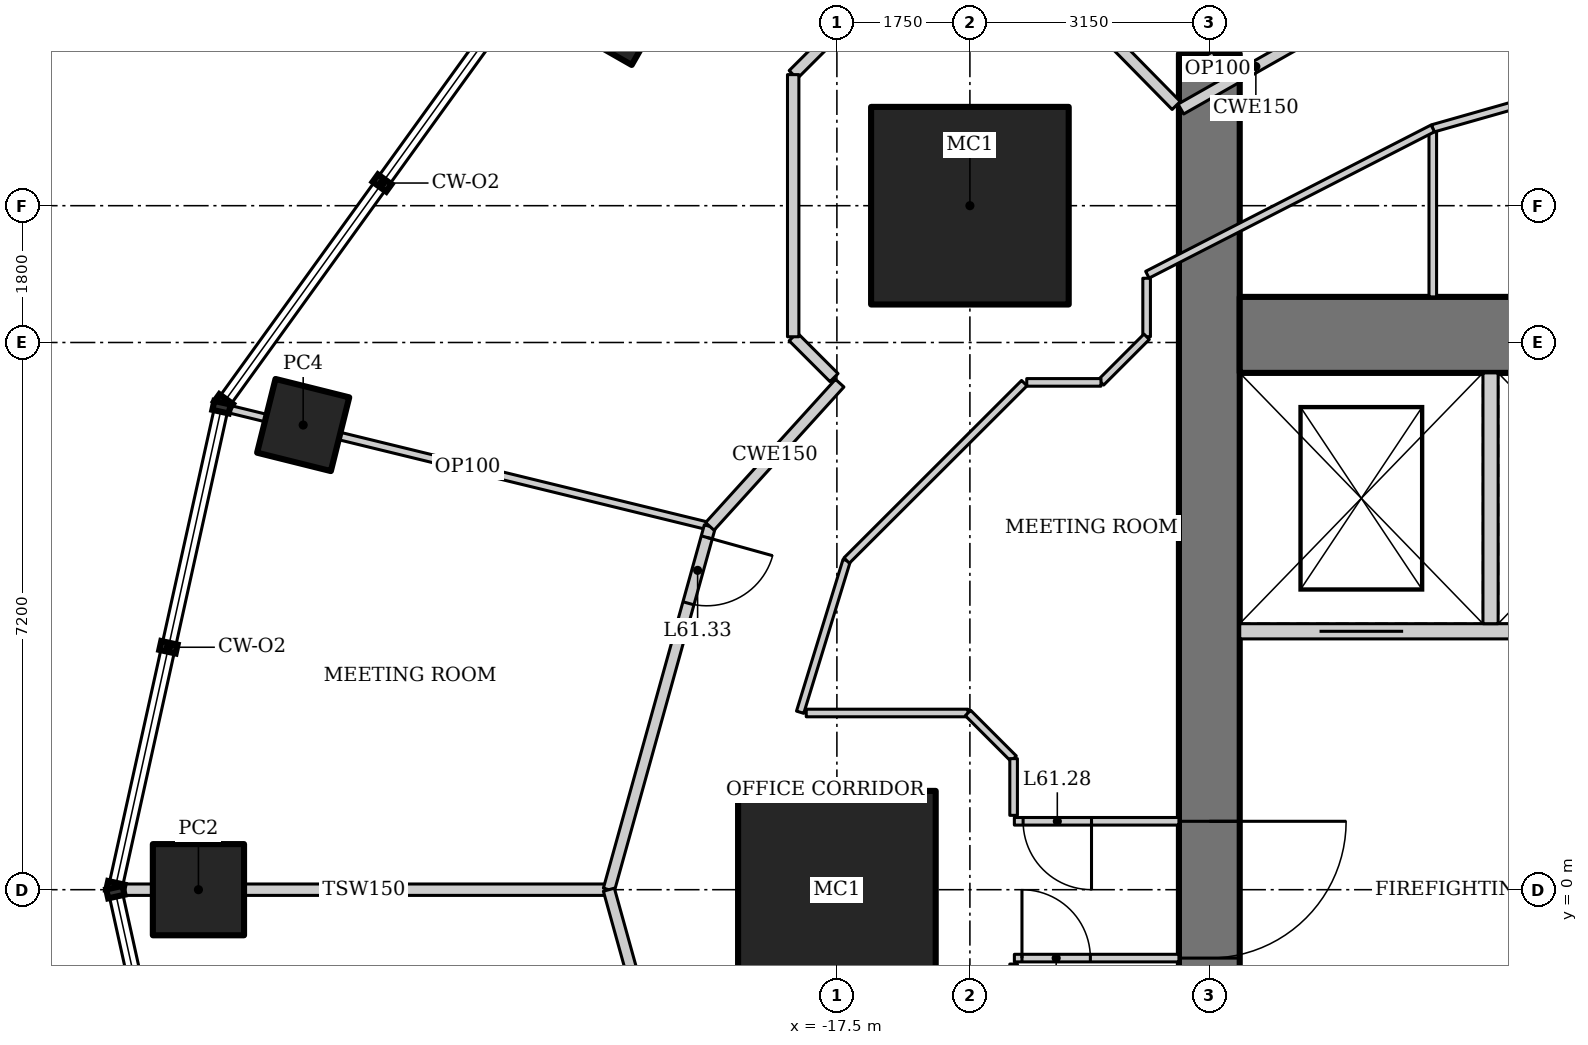
"""IFC4 building model, lengths in metres.
Left out: names, types, materials, properties, quantities, classifications, styles, units other than length and angle.
Written with IfcOpenShell. Run it as: python <this file> out.ifc"""

import sys

from ifc_helpers import new_model, si_unit, direction, frame, frame_2d, origin, origin_2d, place, context, subcontext, project, spatial, rectangle, hollow_rectangle, extrude, element, fill, save


model = new_model("IFC4")
c1 = context("Model", 3, precision=1e-05, world=origin(), true_north=direction((0.0, 1.0)))
c2 = subcontext(c1, "Body", "Model", "MODEL_VIEW")
j1 = project(units=[si_unit("LENGTHUNIT", "METRE"), si_unit("PLANEANGLEUNIT", "RADIAN")], contexts=[c1])
p1 = place(None, origin())
s1 = spatial("IfcSite", under=j1, at=p1, CompositionType="ELEMENT")
p2 = place(p1, origin())
s2 = spatial("IfcBuilding", under=s1, at=p2, CompositionType="ELEMENT")
p3 = place(p2, frame((0.0, 0.0, 262.0)))
s3 = spatial("IfcBuildingStorey", under=s2, at=p3, CompositionType="ELEMENT", Elevation=262.0)
for number, where, z_axis, x_axis in (
    (1, (-15.75, 9.0, 0.0), (0.0, 0.0, 1.0), (1.0, 0.0, 0.0)),
    (2, (-17.5, 0.0, 0.0), (0.0, 0.0, 1.0), (1.0, 0.0, 0.0)),
):
    element("IfcColumn", number, at=place(p3, frame(where, z_axis=z_axis, x_axis=x_axis)), inside=s3, PredefinedType="COLUMN", context=c2, shape_type="SweptSolid", body=[
        extrude(hollow_rectangle(XDim=2.6, YDim=2.6, WallThickness=0.13, at=origin_2d()), origin(), (0.0, 0.0, 1.0), 4.2),
    ])
p4 = place(p3, frame((-20.423, 11.67, 0.0), z_axis=(0.0, 0.0, 1.0), x_axis=(0.496139221777, 0.86824298017, 0.0)))
e3 = element("IfcColumn", 3, at=p4, inside=s3, PredefinedType="COLUMN", context=c2, shape_type="SweptSolid", body=[
    extrude(hollow_rectangle(XDim=1.2, YDim=1.2, WallThickness=0.1, at=origin_2d()), origin(), (0.0, 0.0, 1.0), 2.88),
])
p5 = place(p3, frame((-24.522, 6.114, 0.0), z_axis=(0.0, 0.0, 1.0), x_axis=(0.2419218956, 0.970295726276, 0.0)))
e4 = element("IfcColumn", 4, at=p5, inside=s3, PredefinedType="COLUMN", context=c2, shape_type="SweptSolid", body=[
    extrude(hollow_rectangle(XDim=1.0, YDim=1.0, WallThickness=0.08, at=origin_2d()), origin(), (0.0, 0.0, 1.0), 3.1),
])
p6 = place(p3, frame((-25.9, 0.0, 0.0), z_axis=(0.0, 0.0, 1.0), x_axis=(1.0, 0.0, 0.0)))
e5 = element("IfcColumn", 5, at=p6, inside=s3, PredefinedType="COLUMN", context=c2, shape_type="SweptSolid", body=[
    extrude(hollow_rectangle(XDim=1.2, YDim=1.2, WallThickness=0.1, at=origin_2d()), origin(), (0.0, 0.0, 1.0), 2.88),
])
p7 = place(p3, frame((-12.6, 11.0, 0.0), z_axis=(0.0, 0.0, 1.0), x_axis=(0.0, -1.0, 0.0)))
e6 = element("IfcWall", 6, at=p7, inside=s3, PredefinedType="SHEAR", context=c2, shape_type="SweptSolid", body=[
    extrude(rectangle(XDim=22.0, YDim=0.8, at=frame_2d((11.0, 0.0))), origin(), (0.0, 0.0, 1.0), 4.2),
])
p8 = place(p7, frame((10.1, 0.0, 0.0)))
e7 = element("IfcOpeningElement", 7, at=p8, cuts=e6, PredefinedType="OPENING", context=c2, shape_type="SweptSolid", body=[
    extrude(rectangle(XDim=1.8, YDim=2.1, at=frame_2d((0.9, 1.05))), frame((0.0, 0.41, 0.0), z_axis=(0.0, -1.0, 0.0), x_axis=(1.0, 0.0, 0.0)), (0.0, 0.0, 1.0), 0.82),
])
p9 = place(p3, frame((-5.6, 7.3, 0.0), z_axis=(0.0, 0.0, 1.0), x_axis=(-1.0, 0.0, 0.0)))
e8 = element("IfcWall", 8, at=p9, inside=s3, PredefinedType="SHEAR", context=c2, shape_type="SweptSolid", body=[
    extrude(rectangle(XDim=6.6, YDim=1.0, at=frame_2d((3.3, 0.0))), origin(), (0.0, 0.0, 1.0), 4.2),
])
p10 = place(p3, frame((-12.2, 3.4, 0.0), z_axis=(0.0, 0.0, 1.0), x_axis=(1.0, 0.0, 0.0)))
e9 = element("IfcWall", 9, at=p10, inside=s3, PredefinedType="SOLIDWALL", context=c2, shape_type="SweptSolid", body=[
    extrude(rectangle(XDim=6.6, YDim=0.2, at=frame_2d((3.3, 0.0))), origin(), (0.0, 0.0, 1.0), 4.2),
])
p11 = place(p10, frame((1.05, 0.0, 0.0)))
e10 = element("IfcOpeningElement", 10, at=p11, cuts=e9, PredefinedType="OPENING", context=c2, shape_type="SweptSolid", body=[
    extrude(rectangle(XDim=1.1, YDim=2.2, at=frame_2d((0.55, 1.1))), frame((0.0, 0.11, 0.0), z_axis=(0.0, -1.0, 0.0), x_axis=(1.0, 0.0, 0.0)), (0.0, 0.0, 1.0), 0.22),
])
p12 = place(p10, frame((4.3, 0.0, 0.0)))
e11 = element("IfcOpeningElement", 11, at=p12, cuts=e9, PredefinedType="OPENING", context=c2, shape_type="SweptSolid", body=[
    extrude(rectangle(XDim=1.4, YDim=2.2, at=frame_2d((0.7, 1.1))), frame((0.0, 0.11, 0.0), z_axis=(0.0, -1.0, 0.0), x_axis=(1.0, 0.0, 0.0)), (0.0, 0.0, 1.0), 0.22),
])
p13 = place(p3, frame((-8.9, 3.5, 0.0), z_axis=(0.0, 0.0, 1.0), x_axis=(0.0, 1.0, 0.0)))
e12 = element("IfcWall", 12, at=p13, inside=s3, PredefinedType="SOLIDWALL", context=c2, shape_type="SweptSolid", body=[
    extrude(rectangle(XDim=3.3, YDim=0.2, at=frame_2d((1.65, 0.0))), origin(), (0.0, 0.0, 1.0), 4.2),
])
p14 = place(p3, frame((-25.543, 6.335, 0.0), z_axis=(0.0, 0.0, 1.0), x_axis=(0.971467850621, -0.237171278215, 0.0)))
e13 = element("IfcWall", 13, at=p14, inside=s3, PredefinedType="PARTITIONING", context=c2, shape_type="SweptSolid", body=[
    extrude(rectangle(XDim=6.558, YDim=0.1, at=frame_2d((3.279, 0.0))), origin(), (0.0, 0.0, 1.0), 3.108),
])
p15 = place(p3, frame((-26.944, 0.0, 0.0), z_axis=(0.0, 0.0, 1.0), x_axis=(1.0, 0.0, 0.0)))
e14 = element("IfcWall", 14, at=p15, inside=s3, PredefinedType="PARTITIONING", context=c2, shape_type="SweptSolid", body=[
    extrude(rectangle(XDim=6.444, YDim=0.15, at=frame_2d((3.222, 0.0))), origin(), (0.0, 0.0, 1.0), 3.349),
])
p16 = place(p3, frame((-19.172, 4.78, 0.0), z_axis=(0.0, 0.0, 1.0), x_axis=(-0.26770731566, -0.963500281859, 0.0)))
e15 = element("IfcWall", 15, at=p16, inside=s3, PredefinedType="PARTITIONING", context=c2, shape_type="SweptSolid", body=[
    extrude(rectangle(XDim=4.961, YDim=0.15, at=frame_2d((2.48, 0.0))), origin(), (0.0, 0.0, 1.0), 4.05),
])
p17 = place(p16, frame((0.15, 0.0, 0.0)))
e16 = element("IfcOpeningElement", 16, at=p17, cuts=e15, PredefinedType="OPENING", context=c2, shape_type="SweptSolid", body=[
    extrude(rectangle(XDim=0.9, YDim=2.1, at=frame_2d((0.45, 1.05))), frame((0.0, 0.085, 0.0), z_axis=(0.0, -1.0, 0.0), x_axis=(1.0, 0.0, 0.0)), (0.0, 0.0, 1.0), 0.17),
])
p18 = place(p3, frame((-20.5, 0.0, 0.0), z_axis=(0.0, 0.0, 1.0), x_axis=(0.26770731566, -0.963500281859, 0.0)))
e17 = element("IfcWall", 17, at=p18, inside=s3, PredefinedType="PARTITIONING", context=c2, shape_type="SweptSolid", body=[
    extrude(rectangle(XDim=4.961, YDim=0.15, at=frame_2d((2.48, 0.0))), origin(), (0.0, 0.0, 1.0), 4.05),
])
p19 = place(p3, frame((-9.66, 10.017, 0.0), z_axis=(0.0, 0.0, 1.0), x_axis=(0.0, -1.0, 0.0)))
e18 = element("IfcWall", 18, at=p19, inside=s3, PredefinedType="PARTITIONING", context=c2, shape_type="SweptSolid", body=[
    extrude(rectangle(XDim=2.217, YDim=0.1, at=frame_2d((1.108, 0.0))), origin(), (0.0, 0.0, 1.0), 4.05),
])
p20 = place(p3, frame((-9.66, 10.017, 0.0), z_axis=(0.0, 0.0, 1.0), x_axis=(0.961970251804, 0.27315423234, 0.0)))
e19 = element("IfcWall", 19, at=p20, inside=s3, PredefinedType="PARTITIONING", context=c2, shape_type="SweptSolid", body=[
    extrude(rectangle(XDim=4.137, YDim=0.1, at=frame_2d((2.069, 0.0))), origin(), (0.0, 0.0, 1.0), 4.05),
])
p21 = place(p3, frame((-12.6, 11.0, 0.0), z_axis=(0.0, 0.0, 1.0), x_axis=(0.493794495037, -0.869578631678, 0.0)))
e20 = element("IfcWall", 20, at=p21, inside=s3, PredefinedType="PARTITIONING", context=c2, shape_type="SweptSolid", body=[
    extrude(rectangle(XDim=0.449, YDim=0.1, at=frame_2d((0.225, 0.0))), origin(), (0.0, 0.0, 1.0), 4.05),
])
p22 = place(p3, frame((-15.165, -0.9, 0.0), z_axis=(0.0, 0.0, 1.0), x_axis=(1.0, 0.0, 0.0)))
e21 = element("IfcWall", 21, at=p22, inside=s3, PredefinedType="PARTITIONING", context=c2, shape_type="SweptSolid", body=[
    extrude(rectangle(XDim=2.165, YDim=0.1, at=frame_2d((1.083, 0.0))), origin(), (0.0, 0.0, 1.0), 4.05),
])
p23 = place(p22, frame((0.1, 0.0, 0.0)))
e22 = element("IfcOpeningElement", 22, at=p23, cuts=e21, PredefinedType="OPENING", context=c2, shape_type="SweptSolid", body=[
    extrude(rectangle(XDim=0.9, YDim=2.1, at=frame_2d((0.45, 1.05))), frame((0.0, 0.06, 0.0), z_axis=(0.0, -1.0, 0.0), x_axis=(1.0, 0.0, 0.0)), (0.0, 0.0, 1.0), 0.12),
])
p24 = place(p3, frame((-13.0, 0.9, 0.0), z_axis=(0.0, 0.0, 1.0), x_axis=(-1.0, 0.0, 0.0)))
e23 = element("IfcWall", 23, at=p24, inside=s3, PredefinedType="PARTITIONING", context=c2, shape_type="SweptSolid", body=[
    extrude(rectangle(XDim=2.165, YDim=0.1, at=frame_2d((1.083, 0.0))), origin(), (0.0, 0.0, 1.0), 4.05),
])
p25 = place(p24, frame((1.15, 0.0, 0.0)))
e24 = element("IfcOpeningElement", 24, at=p25, cuts=e23, PredefinedType="OPENING", context=c2, shape_type="SweptSolid", body=[
    extrude(rectangle(XDim=0.9, YDim=2.1, at=frame_2d((0.45, 1.05))), frame((0.0, 0.06, 0.0), z_axis=(0.0, -1.0, 0.0), x_axis=(1.0, 0.0, 0.0)), (0.0, 0.0, 1.0), 0.12),
])
p26 = place(p3, frame((-17.984, 2.335, 0.0), z_axis=(0.0, 0.0, 1.0), x_axis=(0.293231279211, 0.956041535129, 0.0)))
e25 = element("IfcWall", 25, at=p26, inside=s3, PredefinedType="PARTITIONING", context=c2, shape_type="SweptSolid", body=[
    extrude(rectangle(XDim=2.088, YDim=0.1, at=frame_2d((1.044, 0.0))), origin(), (0.0, 0.0, 1.0), 4.05),
])
p27 = place(p3, frame((-15.175, -0.978, 0.0), z_axis=(0.0, 0.0, 1.0), x_axis=(0.0, -1.0, 0.0)))
e26 = element("IfcWall", 26, at=p27, inside=s3, PredefinedType="PARTITIONING", context=c2, shape_type="SweptSolid", body=[
    extrude(rectangle(XDim=0.746, YDim=0.1, at=frame_2d((0.373, 0.0))), origin(), (0.0, 0.0, 1.0), 4.05),
])
p28 = place(p3, frame((-17.903, 2.325, 0.0), z_axis=(0.0, 0.0, 1.0), x_axis=(1.0, 0.0, 0.0)))
e27 = element("IfcWall", 27, at=p28, inside=s3, PredefinedType="PARTITIONING", context=c2, shape_type="SweptSolid", body=[
    extrude(rectangle(XDim=2.128, YDim=0.1, at=frame_2d((1.064, 0.0))), origin(), (0.0, 0.0, 1.0), 4.05),
])
p29 = place(p3, frame((-15.775, 2.325, 0.0), z_axis=(0.0, 0.0, 1.0), x_axis=(0.707106781187, -0.707106781187, 0.0)))
e28 = element("IfcWall", 28, at=p29, inside=s3, PredefinedType="PARTITIONING", context=c2, shape_type="SweptSolid", body=[
    extrude(rectangle(XDim=0.849, YDim=0.1, at=frame_2d((0.425, 0.0))), origin(), (0.0, 0.0, 1.0), 4.05),
])
p30 = place(p3, frame((-15.175, 1.725, 0.0), z_axis=(0.0, 0.0, 1.0), x_axis=(0.0, -1.0, 0.0)))
e29 = element("IfcWall", 29, at=p30, inside=s3, PredefinedType="PARTITIONING", context=c2, shape_type="SweptSolid", body=[
    extrude(rectangle(XDim=0.746, YDim=0.1, at=frame_2d((0.373, 0.0))), origin(), (0.0, 0.0, 1.0), 4.05),
])
p31 = place(p3, frame((-11.001, 11.392, 0.0), z_axis=(0.0, 0.0, 1.0), x_axis=(-0.869722107117, -0.493541747366, 0.0)))
e30 = element("IfcWall", 30, at=p31, inside=s3, PredefinedType="PARTITIONING", context=c2, shape_type="SweptSolid", body=[
    extrude(rectangle(XDim=2.27, YDim=0.15, at=frame_2d((1.135, 0.0))), origin(), (0.0, 0.0, 1.0), 4.05),
])
p32 = place(p3, frame((-17.463, 6.665, 0.0), z_axis=(0.0, 0.0, 1.0), x_axis=(-0.671721890643, -0.74080341632, 0.0)))
e31 = element("IfcWall", 31, at=p32, inside=s3, PredefinedType="PARTITIONING", context=c2, shape_type="SweptSolid", body=[
    extrude(rectangle(XDim=2.544, YDim=0.15, at=frame_2d((1.272, 0.0))), origin(), (0.0, 0.0, 1.0), 4.05),
])
p33 = place(p3, frame((-17.372, 4.331, 0.0), z_axis=(0.0, 0.0, 1.0), x_axis=(0.707587114823, 0.70662612104, 0.0)))
e32 = element("IfcWall", 32, at=p33, inside=s3, PredefinedType="PARTITIONING", context=c2, shape_type="SweptSolid", body=[
    extrude(rectangle(XDim=3.303, YDim=0.1, at=frame_2d((1.651, 0.0))), origin(), (0.0, 0.0, 1.0), 4.05),
])
p34 = place(p3, frame((-13.415, 8.092, 0.0), z_axis=(0.0, 0.0, 1.0), x_axis=(0.889833724874, 0.456284935185, 0.0)))
e33 = element("IfcWall", 33, at=p34, inside=s3, PredefinedType="PARTITIONING", context=c2, shape_type="SweptSolid", body=[
    extrude(rectangle(XDim=4.22, YDim=0.1, at=frame_2d((2.11, 0.0))), origin(), (0.0, 0.0, 1.0), 4.05),
])
p35 = place(p3, frame((-13.425, 8.045, 0.0), z_axis=(0.0, 0.0, 1.0), x_axis=(0.0, -1.0, 0.0)))
e34 = element("IfcWall", 34, at=p35, inside=s3, PredefinedType="PARTITIONING", context=c2, shape_type="SweptSolid", body=[
    extrude(rectangle(XDim=0.77, YDim=0.1, at=frame_2d((0.385, 0.0))), origin(), (0.0, 0.0, 1.0), 4.05),
])
p36 = place(p3, frame((-13.425, 7.275, 0.0), z_axis=(0.0, 0.0, 1.0), x_axis=(-0.707106781187, -0.707106781187, 0.0)))
e35 = element("IfcWall", 35, at=p36, inside=s3, PredefinedType="PARTITIONING", context=c2, shape_type="SweptSolid", body=[
    extrude(rectangle(XDim=0.849, YDim=0.1, at=frame_2d((0.425, 0.0))), origin(), (0.0, 0.0, 1.0), 4.05),
])
p37 = place(p3, frame((-14.025, 6.675, 0.0), z_axis=(0.0, 0.0, 1.0), x_axis=(-1.0, 0.0, 0.0)))
e36 = element("IfcWall", 36, at=p37, inside=s3, PredefinedType="PARTITIONING", context=c2, shape_type="SweptSolid", body=[
    extrude(rectangle(XDim=0.977, YDim=0.1, at=frame_2d((0.488, 0.0))), origin(), (0.0, 0.0, 1.0), 4.05),
])
p38 = place(p3, frame((-18.075, 10.725, 0.0), z_axis=(0.0, 0.0, 1.0), x_axis=(0.707106781187, 0.707106781187, 0.0)))
e37 = element("IfcWall", 37, at=p38, inside=s3, PredefinedType="PARTITIONING", context=c2, shape_type="SweptSolid", body=[
    extrude(rectangle(XDim=0.849, YDim=0.15, at=frame_2d((0.425, 0.0))), origin(), (0.0, 0.0, 1.0), 4.05),
])
p39 = place(p3, frame((-14.025, 11.325, 0.0), z_axis=(0.0, 0.0, 1.0), x_axis=(0.701113567316, -0.713049623606, 0.0)))
e38 = element("IfcWall", 38, at=p39, inside=s3, PredefinedType="PARTITIONING", context=c2, shape_type="SweptSolid", body=[
    extrude(rectangle(XDim=1.411, YDim=0.15, at=frame_2d((0.706, 0.0))), origin(), (0.0, 0.0, 1.0), 4.05),
])
p40 = place(p3, frame((-17.538, 6.738, 0.0), z_axis=(0.0, 0.0, 1.0), x_axis=(-0.707106781187, 0.707106781187, 0.0)))
e39 = element("IfcWall", 39, at=p40, inside=s3, PredefinedType="PARTITIONING", context=c2, shape_type="SweptSolid", body=[
    extrude(rectangle(XDim=0.76, YDim=0.15, at=frame_2d((0.38, 0.0))), origin(), (0.0, 0.0, 1.0), 4.05),
])
p41 = place(p3, frame((-18.075, 7.275, 0.0), z_axis=(0.0, 0.0, 1.0), x_axis=(0.0, 1.0, 0.0)))
e40 = element("IfcWall", 40, at=p41, inside=s3, PredefinedType="PARTITIONING", context=c2, shape_type="SweptSolid", body=[
    extrude(rectangle(XDim=3.449, YDim=0.15, at=frame_2d((1.725, 0.0))), origin(), (0.0, 0.0, 1.0), 3.6),
])
p42 = place(p8, origin())
e41 = element("IfcDoor", 41, at=p42, inside=s3, OperationType="DOUBLE_DOOR_DOUBLE_SWING", PredefinedType="DOOR", context=c2, shape_type="SweptSolid", body=[
    extrude(rectangle(XDim=1.8, YDim=2.1, at=frame_2d((0.9, 1.05))), frame((0.0, 0.025, 0.0), z_axis=(0.0, -1.0, 0.0), x_axis=(1.0, 0.0, 0.0)), (0.0, 0.0, 1.0), 0.05),
])
fill(e7, e41)
p43 = place(p11, origin())
e42 = element("IfcDoor", 42, at=p43, inside=s3, OperationType="DOUBLE_DOOR_SLIDING", PredefinedType="DOOR", context=c2, shape_type="SweptSolid", body=[
    extrude(rectangle(XDim=1.1, YDim=2.2, at=frame_2d((0.55, 1.1))), frame((0.0, 0.025, 0.0), z_axis=(0.0, -1.0, 0.0), x_axis=(1.0, 0.0, 0.0)), (0.0, 0.0, 1.0), 0.05),
])
fill(e10, e42)
p44 = place(p23, origin())
e43 = element("IfcDoor", 43, at=p44, inside=s3, OperationType="SINGLE_SWING_LEFT", PredefinedType="DOOR", context=c2, shape_type="SweptSolid", body=[
    extrude(rectangle(XDim=0.9, YDim=2.1, at=frame_2d((0.45, 1.05))), frame((0.0, 0.025, 0.0), z_axis=(0.0, -1.0, 0.0), x_axis=(1.0, 0.0, 0.0)), (0.0, 0.0, 1.0), 0.05),
])
fill(e22, e43)
p45 = place(p25, origin())
e44 = element("IfcDoor", 44, at=p45, inside=s3, OperationType="SINGLE_SWING_LEFT", PredefinedType="DOOR", context=c2, shape_type="SweptSolid", body=[
    extrude(rectangle(XDim=0.9, YDim=2.1, at=frame_2d((0.45, 1.05))), frame((0.0, 0.025, 0.0), z_axis=(0.0, -1.0, 0.0), x_axis=(1.0, 0.0, 0.0)), (0.0, 0.0, 1.0), 0.05),
])
fill(e24, e44)
p46 = place(p17, origin())
e45 = element("IfcDoor", 45, at=p46, inside=s3, OperationType="SINGLE_SWING_LEFT", PredefinedType="DOOR", context=c2, shape_type="SweptSolid", body=[
    extrude(rectangle(XDim=0.9, YDim=2.1, at=frame_2d((0.45, 1.05))), frame((0.0, 0.025, 0.0), z_axis=(0.0, -1.0, 0.0), x_axis=(1.0, 0.0, 0.0)), (0.0, 0.0, 1.0), 0.05),
])
fill(e16, e45)
save(model, sys.argv[1])
